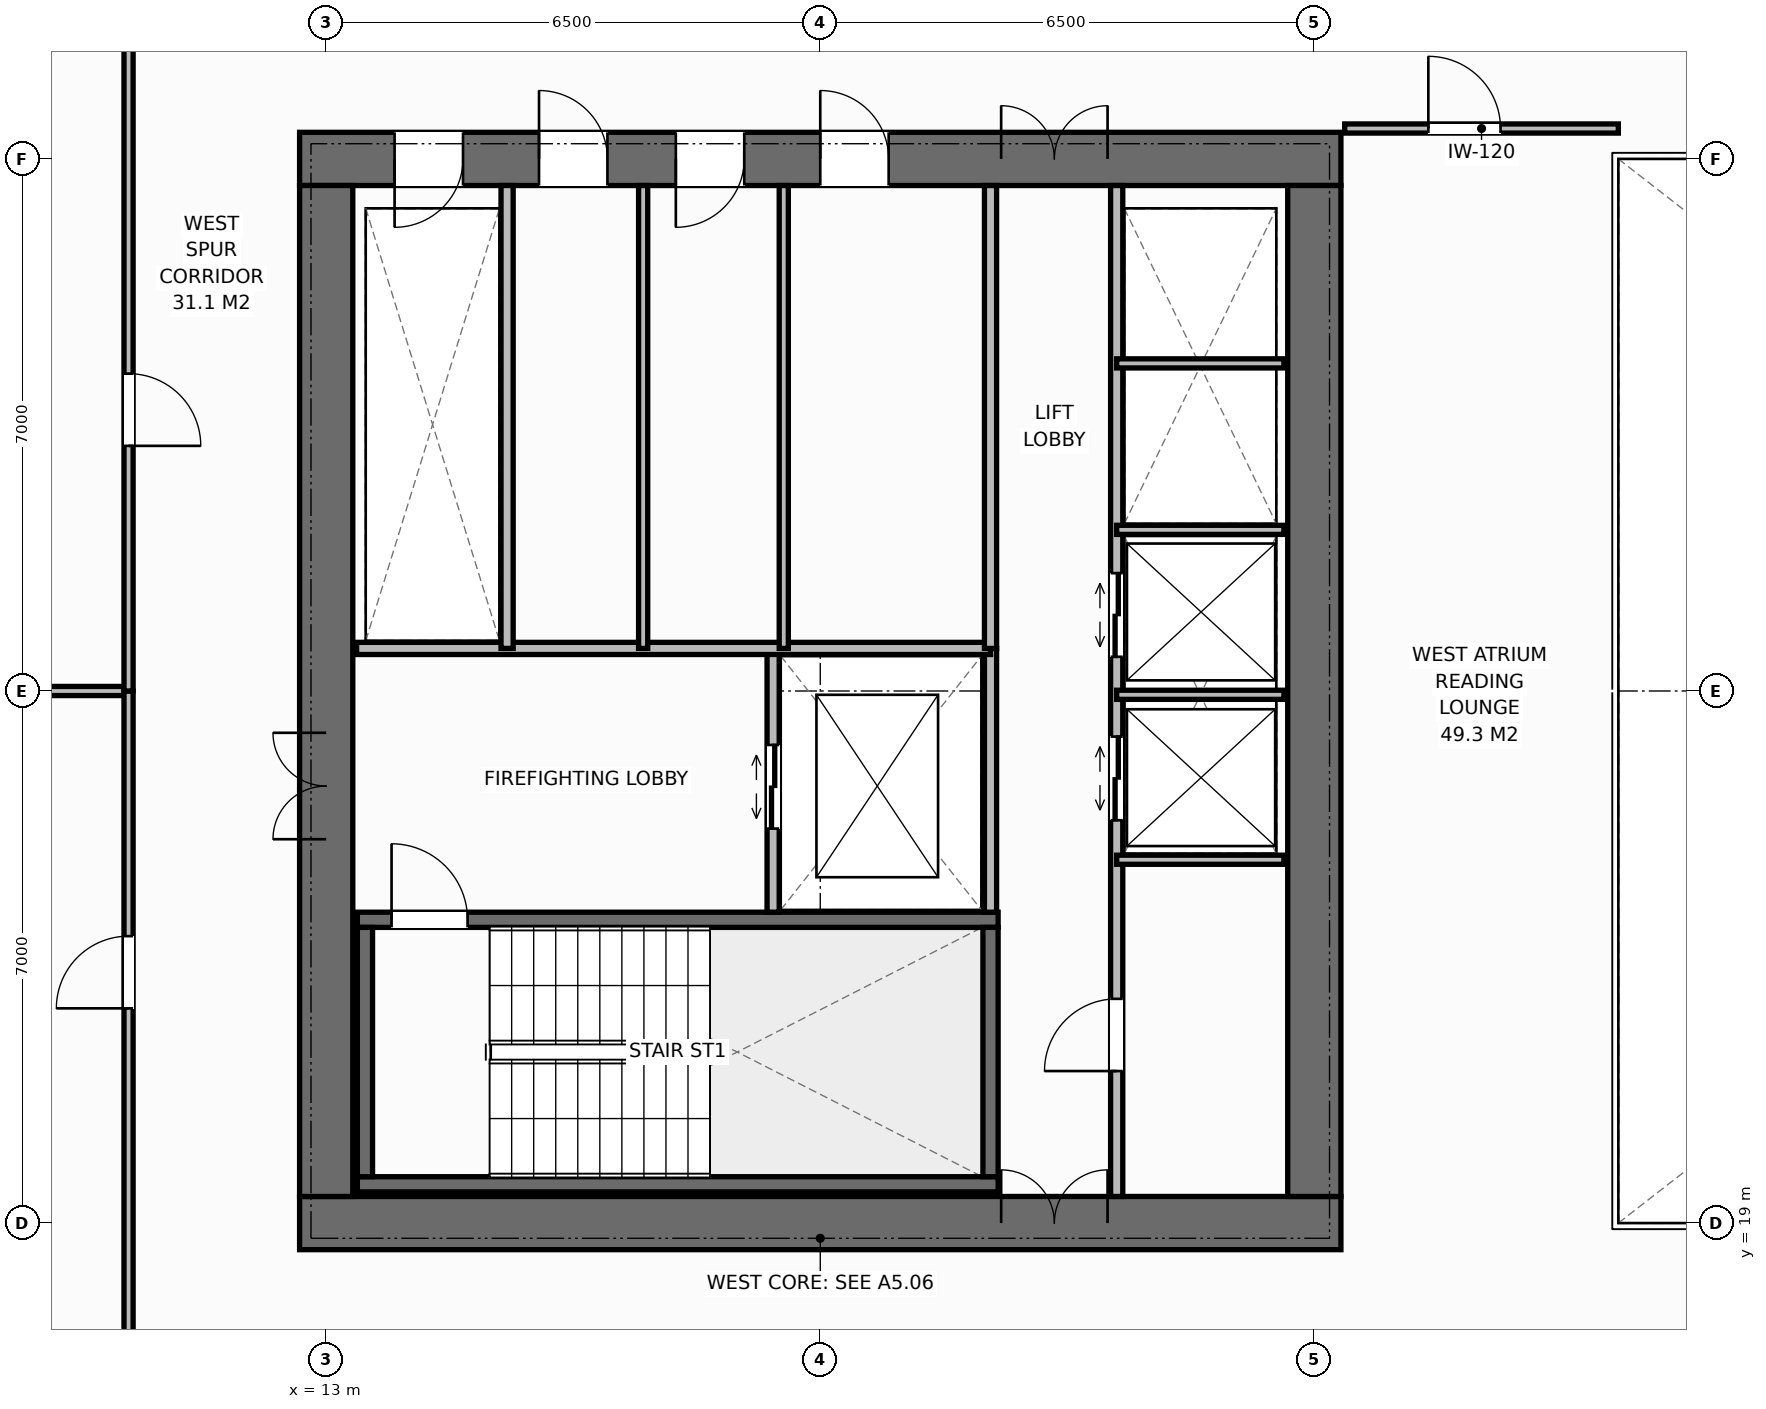
"""IFC4 building model, lengths in metres.
Left out: names, types, materials, properties, quantities, classifications, styles, units other than length and angle.
Written with IfcOpenShell. Run it as: python <this file> out.ifc"""

import sys

from ifc_helpers import new_model, si_unit, direction, frame, frame_2d, origin, place, context, subcontext, project, spatial, rectangle, extrude, element, fill, save


model = new_model("IFC4")
c1 = context("Model", 3, precision=1e-05, world=origin(), true_north=direction((0.0, 1.0)))
c2 = subcontext(c1, "Body", "Model", "MODEL_VIEW")
j1 = project(units=[si_unit("LENGTHUNIT", "METRE"), si_unit("PLANEANGLEUNIT", "RADIAN")], contexts=[c1])
p1 = place(None, origin())
s1 = spatial("IfcSite", under=j1, at=p1, CompositionType="ELEMENT")
p2 = place(p1, origin())
s2 = spatial("IfcBuilding", under=s1, at=p2, CompositionType="ELEMENT")
p3 = place(p2, frame((0.0, 0.0, 105.0)))
s3 = spatial("IfcBuildingStorey", under=s2, at=p3, CompositionType="ELEMENT", Elevation=105.0)
p4 = place(p3, frame((12.65, 19.0, 0.0), z_axis=(0.0, 0.0, 1.0), x_axis=(1.0, 0.0, 0.0)))
e1 = element("IfcWall", 1, at=p4, inside=s3, PredefinedType="SHEAR", context=c2, shape_type="SweptSolid", body=[
    extrude(rectangle(XDim=13.7, YDim=0.7, at=frame_2d((6.85, 0.0))), origin(), (0.0, 0.0, 1.0), 3.8),
])
p5 = place(p4, frame((9.23, 0.0, 0.0)))
e2 = element("IfcOpeningElement", 2, at=p5, cuts=e1, PredefinedType="OPENING", context=c2, shape_type="SweptSolid", body=[
    extrude(rectangle(XDim=1.4, YDim=2.2, at=frame_2d((0.7, 1.1))), frame((0.0, 0.36, 0.0), z_axis=(0.0, -1.0, 0.0), x_axis=(1.0, 0.0, 0.0)), (0.0, 0.0, 1.0), 0.72),
])
p6 = place(p3, frame((12.65, 33.0, 0.0), z_axis=(0.0, 0.0, 1.0), x_axis=(1.0, 0.0, 0.0)))
e3 = element("IfcWall", 3, at=p6, inside=s3, PredefinedType="SHEAR", context=c2, shape_type="SweptSolid", body=[
    extrude(rectangle(XDim=13.7, YDim=0.7, at=frame_2d((6.85, 0.0))), origin(), (0.0, 0.0, 1.0), 3.8),
])
p7 = place(p6, frame((1.25, 0.0, 0.0)))
e4 = element("IfcOpeningElement", 4, at=p7, cuts=e3, PredefinedType="OPENING", context=c2, shape_type="SweptSolid", body=[
    extrude(rectangle(XDim=0.9, YDim=2.15, at=frame_2d((0.45, 1.075))), frame((0.0, 0.36, 0.0), z_axis=(0.0, -1.0, 0.0), x_axis=(1.0, 0.0, 0.0)), (0.0, 0.0, 1.0), 0.72),
])
p8 = place(p6, frame((3.15, 0.0, 0.0)))
e5 = element("IfcOpeningElement", 5, at=p8, cuts=e3, PredefinedType="OPENING", context=c2, shape_type="SweptSolid", body=[
    extrude(rectangle(XDim=0.9, YDim=2.15, at=frame_2d((0.45, 1.075))), frame((0.0, 0.36, 0.0), z_axis=(0.0, -1.0, 0.0), x_axis=(1.0, 0.0, 0.0)), (0.0, 0.0, 1.0), 0.72),
])
p9 = place(p6, frame((4.95, 0.0, 0.0)))
e6 = element("IfcOpeningElement", 6, at=p9, cuts=e3, PredefinedType="OPENING", context=c2, shape_type="SweptSolid", body=[
    extrude(rectangle(XDim=0.9, YDim=2.15, at=frame_2d((0.45, 1.075))), frame((0.0, 0.36, 0.0), z_axis=(0.0, -1.0, 0.0), x_axis=(1.0, 0.0, 0.0)), (0.0, 0.0, 1.0), 0.72),
])
p10 = place(p6, frame((6.85, 0.0, 0.0)))
e7 = element("IfcOpeningElement", 7, at=p10, cuts=e3, PredefinedType="OPENING", context=c2, shape_type="SweptSolid", body=[
    extrude(rectangle(XDim=0.9, YDim=2.15, at=frame_2d((0.45, 1.075))), frame((0.0, 0.36, 0.0), z_axis=(0.0, -1.0, 0.0), x_axis=(1.0, 0.0, 0.0)), (0.0, 0.0, 1.0), 0.72),
])
p11 = place(p6, frame((9.23, 0.0, 0.0)))
e8 = element("IfcOpeningElement", 8, at=p11, cuts=e3, PredefinedType="OPENING", context=c2, shape_type="SweptSolid", body=[
    extrude(rectangle(XDim=1.4, YDim=2.2, at=frame_2d((0.7, 1.1))), frame((0.0, 0.36, 0.0), z_axis=(0.0, -1.0, 0.0), x_axis=(1.0, 0.0, 0.0)), (0.0, 0.0, 1.0), 0.72),
])
p12 = place(p3, frame((13.0, 19.35, 0.0), z_axis=(0.0, 0.0, 1.0), x_axis=(0.0, 1.0, 0.0)))
e9 = element("IfcWall", 9, at=p12, inside=s3, PredefinedType="SHEAR", context=c2, shape_type="SweptSolid", body=[
    extrude(rectangle(XDim=13.3, YDim=0.7, at=frame_2d((6.65, 0.0))), origin(), (0.0, 0.0, 1.0), 3.8),
])
p13 = place(p12, frame((4.7, 0.0, 0.0)))
e10 = element("IfcOpeningElement", 10, at=p13, cuts=e9, PredefinedType="OPENING", context=c2, shape_type="SweptSolid", body=[
    extrude(rectangle(XDim=1.4, YDim=2.2, at=frame_2d((0.7, 1.1))), frame((0.0, 0.36, 0.0), z_axis=(0.0, -1.0, 0.0), x_axis=(1.0, 0.0, 0.0)), (0.0, 0.0, 1.0), 0.72),
])
p14 = place(p3, frame((26.0, 19.35, 0.0), z_axis=(0.0, 0.0, 1.0), x_axis=(0.0, 1.0, 0.0)))
e11 = element("IfcWall", 11, at=p14, inside=s3, PredefinedType="SHEAR", context=c2, shape_type="SweptSolid", body=[
    extrude(rectangle(XDim=13.3, YDim=0.7, at=frame_2d((6.65, 0.0))), origin(), (0.0, 0.0, 1.0), 3.8),
])
p15 = place(p3, frame((13.41, 19.51, 0.0), z_axis=(0.0, 0.0, 1.0), x_axis=(1.0, 0.0, 0.0)))
e12 = element("IfcWall", 12, at=p15, inside=s3, PredefinedType="SHEAR", context=c2, shape_type="SweptSolid", body=[
    extrude(rectangle(XDim=8.43, YDim=0.2, at=frame_2d((4.215, 0.0))), origin(), (0.0, 0.0, 1.0), 3.8),
])
p16 = place(p3, frame((13.41, 22.99, 0.0), z_axis=(0.0, 0.0, 1.0), x_axis=(1.0, 0.0, 0.0)))
e13 = element("IfcWall", 13, at=p16, inside=s3, PredefinedType="SHEAR", context=c2, shape_type="SweptSolid", body=[
    extrude(rectangle(XDim=8.43, YDim=0.2, at=frame_2d((4.215, 0.0))), origin(), (0.0, 0.0, 1.0), 3.8),
])
p17 = place(p16, frame((0.45, 0.0, 0.0)))
e14 = element("IfcOpeningElement", 14, at=p17, cuts=e13, PredefinedType="OPENING", context=c2, shape_type="SweptSolid", body=[
    extrude(rectangle(XDim=1.0, YDim=2.15, at=frame_2d((0.5, 1.075))), frame((0.0, 0.11, 0.0), z_axis=(0.0, -1.0, 0.0), x_axis=(1.0, 0.0, 0.0)), (0.0, 0.0, 1.0), 0.22),
])
for number, where, z_axis, x_axis in (
    (15, (13.51, 19.61, 0.0), (0.0, 0.0, 1.0), (0.0, 1.0, 0.0)),
    (16, (21.74, 19.61, 0.0), (0.0, 0.0, 1.0), (0.0, 1.0, 0.0)),
):
    element("IfcWall", number, at=place(p3, frame(where, z_axis=z_axis, x_axis=x_axis)), inside=s3, PredefinedType="SHEAR", context=c2, shape_type="SweptSolid", body=[
        extrude(rectangle(XDim=3.28, YDim=0.2, at=frame_2d((1.64, 0.0))), origin(), (0.0, 0.0, 1.0), 3.8),
    ])
p18 = place(p3, frame((21.74, 23.09, 0.0), z_axis=(0.0, 0.0, 1.0), x_axis=(0.0, 1.0, 0.0)))
e17 = element("IfcWall", 17, at=p18, inside=s3, PredefinedType="STANDARD", context=c2, shape_type="SweptSolid", body=[
    extrude(rectangle(XDim=3.47, YDim=0.16, at=frame_2d((1.735, 0.0))), origin(), (0.0, 0.0, 1.0), 3.565),
])
p19 = place(p3, frame((18.88, 23.09, 0.0), z_axis=(0.0, 0.0, 1.0), x_axis=(0.0, 1.0, 0.0)))
e18 = element("IfcWall", 18, at=p19, inside=s3, PredefinedType="STANDARD", context=c2, shape_type="SweptSolid", body=[
    extrude(rectangle(XDim=3.47, YDim=0.16, at=frame_2d((1.735, 0.0))), origin(), (0.0, 0.0, 1.0), 3.565),
])
p20 = place(p19, frame((1.1, 0.0, 0.0)))
e19 = element("IfcOpeningElement", 19, at=p20, cuts=e18, PredefinedType="OPENING", context=c2, shape_type="SweptSolid", body=[
    extrude(rectangle(XDim=1.1, YDim=2.2, at=frame_2d((0.55, 1.1))), frame((0.0, 0.09, 0.0), z_axis=(0.0, -1.0, 0.0), x_axis=(1.0, 0.0, 0.0)), (0.0, 0.0, 1.0), 0.18),
])
p21 = place(p3, frame((13.4, 26.56, 0.0), z_axis=(0.0, 0.0, 1.0), x_axis=(1.0, 0.0, 0.0)))
e20 = element("IfcWall", 20, at=p21, inside=s3, PredefinedType="STANDARD", context=c2, shape_type="SweptSolid", body=[
    extrude(rectangle(XDim=8.34, YDim=0.16, at=frame_2d((4.17, 0.0))), origin(), (0.0, 0.0, 1.0), 3.565),
])
p22 = place(p3, frame((15.38, 26.56, 0.0), z_axis=(0.0, 0.0, 1.0), x_axis=(0.0, 1.0, 0.0)))
e21 = element("IfcWall", 21, at=p22, inside=s3, PredefinedType="STANDARD", context=c2, shape_type="SweptSolid", body=[
    extrude(rectangle(XDim=6.09, YDim=0.16, at=frame_2d((3.045, 0.0))), origin(), (0.0, 0.0, 1.0), 3.565),
])
for number, where, z_axis, x_axis in (
    (22, (17.17, 26.56, 0.0), (0.0, 0.0, 1.0), (0.0, 1.0, 0.0)),
    (23, (19.02, 26.56, 0.0), (0.0, 0.0, 1.0), (0.0, 1.0, 0.0)),
):
    element("IfcWall", number, at=place(p3, frame(where, z_axis=z_axis, x_axis=x_axis)), inside=s3, PredefinedType="PARTITIONING", context=c2, shape_type="SweptSolid", body=[
        extrude(rectangle(XDim=6.09, YDim=0.12, at=frame_2d((3.045, 0.0))), origin(), (0.0, 0.0, 1.0), 3.565),
    ])
p23 = place(p3, frame((21.74, 26.56, 0.0), z_axis=(0.0, 0.0, 1.0), x_axis=(0.0, 1.0, 0.0)))
e24 = element("IfcWall", 24, at=p23, inside=s3, PredefinedType="STANDARD", context=c2, shape_type="SweptSolid", body=[
    extrude(rectangle(XDim=6.09, YDim=0.16, at=frame_2d((3.045, 0.0))), origin(), (0.0, 0.0, 1.0), 3.565),
])
p24 = place(p3, frame((23.4, 19.35, 0.0), z_axis=(0.0, 0.0, 1.0), x_axis=(0.0, 1.0, 0.0)))
e25 = element("IfcWall", 25, at=p24, inside=s3, PredefinedType="STANDARD", context=c2, shape_type="SweptSolid", body=[
    extrude(rectangle(XDim=13.3, YDim=0.16, at=frame_2d((6.65, 0.0))), origin(), (0.0, 0.0, 1.0), 3.565),
])
p25 = place(p24, frame((1.65, 0.0, 0.0)))
e26 = element("IfcOpeningElement", 26, at=p25, cuts=e25, PredefinedType="OPENING", context=c2, shape_type="SweptSolid", body=[
    extrude(rectangle(XDim=0.95, YDim=2.15, at=frame_2d((0.475, 1.075))), frame((0.0, 0.09, 0.0), z_axis=(0.0, -1.0, 0.0), x_axis=(1.0, 0.0, 0.0)), (0.0, 0.0, 1.0), 0.18),
])
p26 = place(p24, frame((4.95, 0.0, 0.0)))
e27 = element("IfcOpeningElement", 27, at=p26, cuts=e25, PredefinedType="OPENING", context=c2, shape_type="SweptSolid", body=[
    extrude(rectangle(XDim=1.1, YDim=2.2, at=frame_2d((0.55, 1.1))), frame((0.0, 0.09, 0.0), z_axis=(0.0, -1.0, 0.0), x_axis=(1.0, 0.0, 0.0)), (0.0, 0.0, 1.0), 0.18),
])
p27 = place(p24, frame((7.1, 0.0, 0.0)))
e28 = element("IfcOpeningElement", 28, at=p27, cuts=e25, PredefinedType="OPENING", context=c2, shape_type="SweptSolid", body=[
    extrude(rectangle(XDim=1.1, YDim=2.2, at=frame_2d((0.55, 1.1))), frame((0.0, 0.09, 0.0), z_axis=(0.0, -1.0, 0.0), x_axis=(1.0, 0.0, 0.0)), (0.0, 0.0, 1.0), 0.18),
])
for number, where, z_axis, x_axis in (
    (29, (23.4, 23.78, 0.0), (0.0, 0.0, 1.0), (1.0, 0.0, 0.0)),
    (30, (23.4, 25.95, 0.0), (0.0, 0.0, 1.0), (1.0, 0.0, 0.0)),
    (31, (23.4, 28.12, 0.0), (0.0, 0.0, 1.0), (1.0, 0.0, 0.0)),
    (32, (23.4, 30.31, 0.0), (0.0, 0.0, 1.0), (1.0, 0.0, 0.0)),
):
    element("IfcWall", number, at=place(p3, frame(where, z_axis=z_axis, x_axis=x_axis)), inside=s3, PredefinedType="PARTITIONING", context=c2, shape_type="SweptSolid", body=[
        extrude(rectangle(XDim=2.2, YDim=0.12, at=frame_2d((1.1, 0.0))), origin(), (0.0, 0.0, 1.0), 3.565),
    ])
p28 = place(p3, frame((26.4, 33.4, 0.0), z_axis=(0.0, 0.0, 1.0), x_axis=(1.0, 0.0, 0.0)))
e33 = element("IfcWall", 33, at=p28, inside=s3, PredefinedType="PARTITIONING", context=c2, shape_type="SweptSolid", body=[
    extrude(rectangle(XDim=3.6, YDim=0.12, at=frame_2d((1.8, 0.0))), origin(), (0.0, 0.0, 1.0), 3.565),
])
p29 = place(p28, frame((1.1, 0.0, 0.0)))
e34 = element("IfcOpeningElement", 34, at=p29, cuts=e33, PredefinedType="OPENING", context=c2, shape_type="SweptSolid", body=[
    extrude(rectangle(XDim=0.95, YDim=2.15, at=frame_2d((0.475, 1.075))), frame((0.0, 0.07, 0.0), z_axis=(0.0, -1.0, 0.0), x_axis=(1.0, 0.0, 0.0)), (0.0, 0.0, 1.0), 0.14),
])
p30 = place(p3, frame((1.82, 26.0, 0.0), z_axis=(0.0, 0.0, 1.0), x_axis=(1.0, 0.0, 0.0)))
e35 = element("IfcWall", 35, at=p30, inside=s3, PredefinedType="PARTITIONING", context=c2, shape_type="SweptSolid", body=[
    extrude(rectangle(XDim=8.58, YDim=0.12, at=frame_2d((4.29, 0.0))), origin(), (0.0, 0.0, 1.0), 3.565),
])
p31 = place(p3, frame((10.4, 16.5, 0.0), z_axis=(0.0, 0.0, 1.0), x_axis=(0.0, 1.0, 0.0)))
e36 = element("IfcWall", 36, at=p31, inside=s3, PredefinedType="PARTITIONING", context=c2, shape_type="SweptSolid", body=[
    extrude(rectangle(XDim=9.5, YDim=0.12, at=frame_2d((4.75, 0.0))), origin(), (0.0, 0.0, 1.0), 3.565),
])
p32 = place(p31, frame((5.325, 0.0, 0.0)))
e37 = element("IfcOpeningElement", 37, at=p32, cuts=e36, PredefinedType="OPENING", context=c2, shape_type="SweptSolid", body=[
    extrude(rectangle(XDim=0.95, YDim=2.15, at=frame_2d((0.475, 1.075))), frame((0.0, 0.07, 0.0), z_axis=(0.0, -1.0, 0.0), x_axis=(1.0, 0.0, 0.0)), (0.0, 0.0, 1.0), 0.14),
])
p33 = place(p3, frame((10.4, 26.0, 0.0), z_axis=(0.0, 0.0, 1.0), x_axis=(0.0, 1.0, 0.0)))
e38 = element("IfcWall", 38, at=p33, inside=s3, PredefinedType="PARTITIONING", context=c2, shape_type="SweptSolid", body=[
    extrude(rectangle(XDim=9.5, YDim=0.12, at=frame_2d((4.75, 0.0))), origin(), (0.0, 0.0, 1.0), 3.565),
])
p34 = place(p33, frame((3.225, 0.0, 0.0)))
e39 = element("IfcOpeningElement", 39, at=p34, cuts=e38, PredefinedType="OPENING", context=c2, shape_type="SweptSolid", body=[
    extrude(rectangle(XDim=0.95, YDim=2.15, at=frame_2d((0.475, 1.075))), frame((0.0, 0.07, 0.0), z_axis=(0.0, -1.0, 0.0), x_axis=(1.0, 0.0, 0.0)), (0.0, 0.0, 1.0), 0.14),
])
p35 = place(p17, origin())
e40 = element("IfcDoor", 40, at=p35, inside=s3, OperationType="SINGLE_SWING_LEFT", PredefinedType="DOOR", context=c2, shape_type="SweptSolid", body=[
    extrude(rectangle(XDim=1.0, YDim=2.15, at=frame_2d((0.5, 1.075))), frame((0.0, 0.025, 0.0), z_axis=(0.0, -1.0, 0.0), x_axis=(1.0, 0.0, 0.0)), (0.0, 0.0, 1.0), 0.05),
])
fill(e14, e40)
p36 = place(p13, origin())
e41 = element("IfcDoor", 41, at=p36, inside=s3, OperationType="DOUBLE_DOOR_SINGLE_SWING", PredefinedType="DOOR", context=c2, shape_type="SweptSolid", body=[
    extrude(rectangle(XDim=1.4, YDim=2.2, at=frame_2d((0.7, 1.1))), frame((0.0, 0.025, 0.0), z_axis=(0.0, -1.0, 0.0), x_axis=(1.0, 0.0, 0.0)), (0.0, 0.0, 1.0), 0.05),
])
fill(e10, e41)
p37 = place(p20, origin())
e42 = element("IfcDoor", 42, at=p37, inside=s3, OperationType="DOUBLE_DOOR_SLIDING", PredefinedType="DOOR", context=c2, shape_type="SweptSolid", body=[
    extrude(rectangle(XDim=1.1, YDim=2.2, at=frame_2d((0.55, 1.1))), frame((0.0, 0.025, 0.0), z_axis=(0.0, -1.0, 0.0), x_axis=(1.0, 0.0, 0.0)), (0.0, 0.0, 1.0), 0.05),
])
fill(e19, e42)
p38 = place(p7, origin())
e43 = element("IfcDoor", 43, at=p38, inside=s3, OperationType="SINGLE_SWING_RIGHT", PredefinedType="DOOR", context=c2, shape_type="SweptSolid", body=[
    extrude(rectangle(XDim=0.9, YDim=2.15, at=frame_2d((0.45, 1.075))), frame((0.0, -0.075, 0.0), z_axis=(0.0, -1.0, 0.0), x_axis=(1.0, 0.0, 0.0)), (0.0, 0.0, 1.0), 0.05),
])
fill(e4, e43)
p39 = place(p8, origin())
e44 = element("IfcDoor", 44, at=p39, inside=s3, OperationType="SINGLE_SWING_LEFT", PredefinedType="DOOR", context=c2, shape_type="SweptSolid", body=[
    extrude(rectangle(XDim=0.9, YDim=2.15, at=frame_2d((0.45, 1.075))), frame((0.0, -0.075, 0.0), z_axis=(0.0, -1.0, 0.0), x_axis=(1.0, 0.0, 0.0)), (0.0, 0.0, 1.0), 0.05),
])
fill(e5, e44)
p40 = place(p9, origin())
e45 = element("IfcDoor", 45, at=p40, inside=s3, OperationType="SINGLE_SWING_RIGHT", PredefinedType="DOOR", context=c2, shape_type="SweptSolid", body=[
    extrude(rectangle(XDim=0.9, YDim=2.15, at=frame_2d((0.45, 1.075))), frame((0.0, -0.075, 0.0), z_axis=(0.0, -1.0, 0.0), x_axis=(1.0, 0.0, 0.0)), (0.0, 0.0, 1.0), 0.05),
])
fill(e6, e45)
p41 = place(p10, origin())
e46 = element("IfcDoor", 46, at=p41, inside=s3, OperationType="SINGLE_SWING_LEFT", PredefinedType="DOOR", context=c2, shape_type="SweptSolid", body=[
    extrude(rectangle(XDim=0.9, YDim=2.15, at=frame_2d((0.45, 1.075))), frame((0.0, -0.075, 0.0), z_axis=(0.0, -1.0, 0.0), x_axis=(1.0, 0.0, 0.0)), (0.0, 0.0, 1.0), 0.05),
])
fill(e7, e46)
p42 = place(p5, origin())
e47 = element("IfcDoor", 47, at=p42, inside=s3, OperationType="DOUBLE_DOOR_SINGLE_SWING", PredefinedType="DOOR", context=c2, shape_type="SweptSolid", body=[
    extrude(rectangle(XDim=1.4, YDim=2.2, at=frame_2d((0.7, 1.1))), frame((0.0, 0.125, 0.0), z_axis=(0.0, -1.0, 0.0), x_axis=(1.0, 0.0, 0.0)), (0.0, 0.0, 1.0), 0.05),
])
fill(e2, e47)
p43 = place(p11, origin())
e48 = element("IfcDoor", 48, at=p43, inside=s3, OperationType="DOUBLE_DOOR_SINGLE_SWING", PredefinedType="DOOR", context=c2, shape_type="SweptSolid", body=[
    extrude(rectangle(XDim=1.4, YDim=2.2, at=frame_2d((0.7, 1.1))), frame((0.0, -0.075, 0.0), z_axis=(0.0, -1.0, 0.0), x_axis=(1.0, 0.0, 0.0)), (0.0, 0.0, 1.0), 0.05),
])
fill(e8, e48)
p44 = place(p25, origin())
e49 = element("IfcDoor", 49, at=p44, inside=s3, OperationType="SINGLE_SWING_LEFT", PredefinedType="DOOR", context=c2, shape_type="SweptSolid", body=[
    extrude(rectangle(XDim=0.95, YDim=2.15, at=frame_2d((0.475, 1.075))), frame((0.0, 0.025, 0.0), z_axis=(0.0, -1.0, 0.0), x_axis=(1.0, 0.0, 0.0)), (0.0, 0.0, 1.0), 0.05),
])
fill(e26, e49)
p45 = place(p26, origin())
e50 = element("IfcDoor", 50, at=p45, inside=s3, OperationType="DOUBLE_DOOR_SLIDING", PredefinedType="DOOR", context=c2, shape_type="SweptSolid", body=[
    extrude(rectangle(XDim=1.1, YDim=2.2, at=frame_2d((0.55, 1.1))), frame((0.0, 0.025, 0.0), z_axis=(0.0, -1.0, 0.0), x_axis=(1.0, 0.0, 0.0)), (0.0, 0.0, 1.0), 0.05),
])
fill(e27, e50)
p46 = place(p27, origin())
e51 = element("IfcDoor", 51, at=p46, inside=s3, OperationType="DOUBLE_DOOR_SLIDING", PredefinedType="DOOR", context=c2, shape_type="SweptSolid", body=[
    extrude(rectangle(XDim=1.1, YDim=2.2, at=frame_2d((0.55, 1.1))), frame((0.0, 0.025, 0.0), z_axis=(0.0, -1.0, 0.0), x_axis=(1.0, 0.0, 0.0)), (0.0, 0.0, 1.0), 0.05),
])
fill(e28, e51)
p47 = place(p29, origin())
e52 = element("IfcDoor", 52, at=p47, inside=s3, OperationType="SINGLE_SWING_LEFT", PredefinedType="DOOR", context=c2, shape_type="SweptSolid", body=[
    extrude(rectangle(XDim=0.95, YDim=2.15, at=frame_2d((0.475, 1.075))), frame((0.0, 0.025, 0.0), z_axis=(0.0, -1.0, 0.0), x_axis=(1.0, 0.0, 0.0)), (0.0, 0.0, 1.0), 0.05),
])
fill(e34, e52)
p48 = place(p32, origin())
e53 = element("IfcDoor", 53, at=p48, inside=s3, OperationType="SINGLE_SWING_LEFT", PredefinedType="DOOR", context=c2, shape_type="SweptSolid", body=[
    extrude(rectangle(XDim=0.95, YDim=2.15, at=frame_2d((0.475, 1.075))), frame((0.0, 0.025, 0.0), z_axis=(0.0, -1.0, 0.0), x_axis=(1.0, 0.0, 0.0)), (0.0, 0.0, 1.0), 0.05),
])
fill(e37, e53)
p49 = place(p34, origin())
e54 = element("IfcDoor", 54, at=p49, inside=s3, OperationType="SINGLE_SWING_RIGHT", PredefinedType="DOOR", context=c2, shape_type="SweptSolid", body=[
    extrude(rectangle(XDim=0.95, YDim=2.15, at=frame_2d((0.475, 1.075))), frame((0.0, 0.025, 0.0), z_axis=(0.0, -1.0, 0.0), x_axis=(1.0, 0.0, 0.0)), (0.0, 0.0, 1.0), 0.05),
])
fill(e39, e54)
save(model, sys.argv[1])
